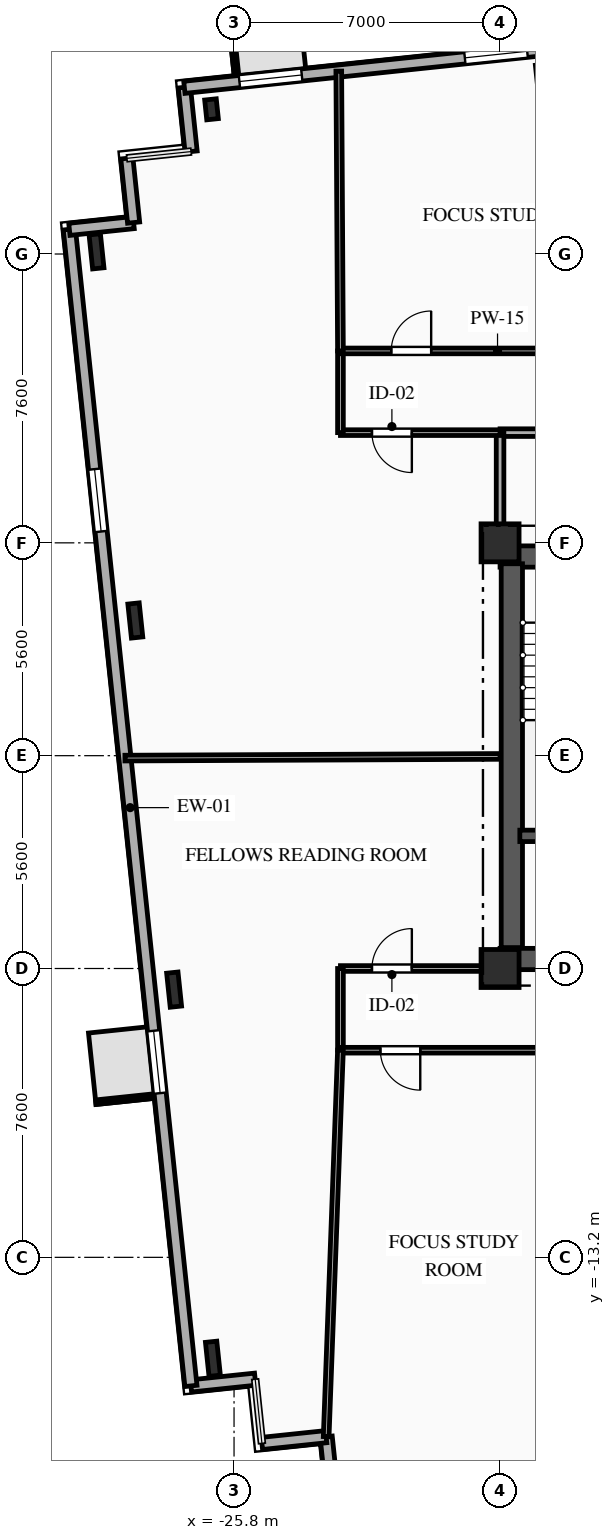
"""IFC4 building model, lengths in metres.
Left out: names, types, materials, properties, quantities, classifications, styles, units other than length and angle.
Written with IfcOpenShell. Run it as: python <this file> out.ifc"""

import sys

from ifc_helpers import new_model, si_unit, direction, frame, frame_2d, origin, origin_2d, place, context, subcontext, project, spatial, rectangle, i_section, extrude, element, fill, save


model = new_model("IFC4")
c1 = context("Model", 3, precision=1e-05, world=origin(), true_north=direction((0.0, 1.0)))
c2 = subcontext(c1, "Body", "Model", "MODEL_VIEW")
j1 = project(units=[si_unit("LENGTHUNIT", "METRE"), si_unit("PLANEANGLEUNIT", "RADIAN")], contexts=[c1])
p1 = place(None, origin())
s1 = spatial("IfcSite", under=j1, at=p1, CompositionType="ELEMENT")
p2 = place(p1, origin())
s2 = spatial("IfcBuilding", under=s1, at=p2, CompositionType="ELEMENT")
p3 = place(p2, frame((0.0, 0.0, 122.55)))
s3 = spatial("IfcBuildingStorey", under=s2, at=p3, CompositionType="ELEMENT", Elevation=122.55)
for number, where, z_axis, x_axis in (
    (1, (-18.8, -5.6, 0.0), (0.0, 0.0, 1.0), (1.0, 0.0, 0.0)),
    (2, (-18.8, 5.6, 0.0), (0.0, 0.0, 1.0), (1.0, 0.0, 0.0)),
):
    element("IfcColumn", number, at=place(p3, frame(where, z_axis=z_axis, x_axis=x_axis)), inside=s3, PredefinedType="COLUMN", context=c2, shape_type="SweptSolid", body=[
        extrude(rectangle(XDim=1.0, YDim=1.0, at=origin_2d()), origin(), (0.0, 0.0, 1.0), 3.35),
    ])
p4 = place(p3, frame((-26.393, 17.007, 0.0), z_axis=(0.0, 0.0, 1.0), x_axis=(0.994521895368, 0.104528463268, 0.0)))
e3 = element("IfcColumn", 3, at=p4, inside=s3, PredefinedType="COLUMN", context=c2, shape_type="SweptSolid", body=[
    extrude(i_section(OverallWidth=0.306, OverallDepth=0.524, WebThickness=0.021, FlangeThickness=0.04, FilletRadius=0.027, at=origin_2d()), origin(), (0.0, 0.0, 1.0), 3.35),
])
for number, where, z_axis, x_axis in (
    (4, (-29.419, 13.271, 0.0), (0.0, 0.0, 1.0), (0.995, 0.105, 0.0)),
    (5, (-28.398, 3.557, 0.0), (0.0, 0.0, 1.0), (0.995, 0.105, 0.0)),
    (6, (-27.377, -6.156, 0.0), (0.0, 0.0, 1.0), (0.995, 0.105, 0.0)),
    (7, (-26.356, -15.869, 0.0), (0.0, 0.0, 1.0), (0.995, 0.105, 0.0)),
):
    element("IfcColumn", number, at=place(p3, frame(where, z_axis=z_axis, x_axis=x_axis)), inside=s3, PredefinedType="COLUMN", context=c2, shape_type="SweptSolid", body=[
        extrude(i_section(OverallWidth=0.3, OverallDepth=0.9, WebThickness=0.019, FlangeThickness=0.035, FilletRadius=0.03, at=origin_2d()), origin(), (0.0, 0.0, 1.0), 3.35),
    ])
for number, where, z_axis, x_axis in (
    (8, (-23.198, -19.609, 0.0), (0.0, 0.0, 1.0), (-0.105, 0.995, 0.0)),
    (9, (-23.376, -17.919, 0.0), (0.0, 0.0, 1.0), (-0.995, -0.105, 0.0)),
):
    element("IfcWall", number, at=place(p3, frame(where, z_axis=z_axis, x_axis=x_axis)), inside=s3, PredefinedType="SOLIDWALL", context=c2, shape_type="SweptSolid", body=[
        extrude(rectangle(XDim=1.7, YDim=0.32, at=frame_2d((0.85, 0.0))), origin(), (0.0, 0.0, 1.0), 3.0),
    ])
p5 = place(p3, frame((-25.244, -16.406, 0.0), z_axis=(0.0, 0.0, 1.0), x_axis=(-0.994521177842, -0.104535289845, 0.0)))
e10 = element("IfcWall", 10, at=p5, inside=s3, PredefinedType="SOLIDWALL", context=c2, shape_type="SweptSolid", body=[
    extrude(rectangle(XDim=1.7, YDim=0.32, at=frame_2d((0.85, 0.0))), origin(), (0.0, 0.0, 1.0), 3.0),
])
p6 = place(p3, frame((-26.935, -16.583, 0.0), z_axis=(0.0, 0.0, 1.0), x_axis=(-0.104524887486, 0.994522271192, 0.0)))
e11 = element("IfcWall", 11, at=p6, inside=s3, PredefinedType="SOLIDWALL", context=c2, shape_type="SweptSolid", body=[
    extrude(rectangle(XDim=30.6, YDim=0.32, at=frame_2d((15.3, 0.0))), origin(), (0.0, 0.0, 1.0), 3.0),
])
p7 = place(p6, frame((7.746, 0.0, 0.85)))
e12 = element("IfcOpeningElement", 12, at=p7, cuts=e11, PredefinedType="OPENING", context=c2, shape_type="SweptSolid", body=[
    extrude(rectangle(XDim=1.65, YDim=1.85, at=frame_2d((0.825, 0.925))), frame((0.0, 0.17, 0.0), z_axis=(0.0, -1.0, 0.0), x_axis=(1.0, 0.0, 0.0)), (0.0, 0.0, 1.0), 0.34),
])
p8 = place(p6, frame((22.606, 0.0, 0.85)))
e13 = element("IfcOpeningElement", 13, at=p8, cuts=e11, PredefinedType="OPENING", context=c2, shape_type="SweptSolid", body=[
    extrude(rectangle(XDim=1.65, YDim=1.85, at=frame_2d((0.825, 0.925))), frame((0.0, 0.17, 0.0), z_axis=(0.0, -1.0, 0.0), x_axis=(1.0, 0.0, 0.0)), (0.0, 0.0, 1.0), 0.34),
])
for number, where, z_axis, x_axis in (
    (14, (-30.133, 13.849, 0.0), (0.0, 0.0, 1.0), (0.995, 0.104, 0.0)),
    (15, (-28.443, 14.027, 0.0), (0.0, 0.0, 1.0), (-0.105, 0.995, 0.0)),
    (16, (-26.93, 15.895, 0.0), (0.0, 0.0, 1.0), (-0.105, 0.995, 0.0)),
):
    element("IfcWall", number, at=place(p3, frame(where, z_axis=z_axis, x_axis=x_axis)), inside=s3, PredefinedType="SOLIDWALL", context=c2, shape_type="SweptSolid", body=[
        extrude(rectangle(XDim=1.7, YDim=0.32, at=frame_2d((0.85, 0.0))), origin(), (0.0, 0.0, 1.0), 3.0),
    ])
p9 = place(p3, frame((-27.107, 17.586, 0.0), z_axis=(0.0, 0.0, 1.0), x_axis=(0.994521628355, 0.104531003701, 0.0)))
e17 = element("IfcWall", 17, at=p9, inside=s3, PredefinedType="SOLIDWALL", context=c2, shape_type="SweptSolid", body=[
    extrude(rectangle(XDim=53.8, YDim=0.32, at=frame_2d((26.9, 0.0))), origin(), (0.0, 0.0, 1.0), 3.0),
])
p10 = place(p9, frame((1.457, 0.0, 0.85)))
e18 = element("IfcOpeningElement", 18, at=p10, cuts=e17, PredefinedType="OPENING", context=c2, shape_type="SweptSolid", body=[
    extrude(rectangle(XDim=1.65, YDim=1.85, at=frame_2d((0.825, 0.925))), frame((0.0, 0.17, 0.0), z_axis=(0.0, -1.0, 0.0), x_axis=(1.0, 0.0, 0.0)), (0.0, 0.0, 1.0), 0.34),
])
p11 = place(p9, frame((7.421, 0.0, 0.85)))
e19 = element("IfcOpeningElement", 19, at=p11, cuts=e17, PredefinedType="OPENING", context=c2, shape_type="SweptSolid", body=[
    extrude(rectangle(XDim=1.65, YDim=1.85, at=frame_2d((0.825, 0.925))), frame((0.0, 0.17, 0.0), z_axis=(0.0, -1.0, 0.0), x_axis=(1.0, 0.0, 0.0)), (0.0, 0.0, 1.0), 0.34),
])
p12 = place(p9, frame((16.743, 0.0, 0.85)))
e20 = element("IfcOpeningElement", 20, at=p12, cuts=e17, PredefinedType="OPENING", context=c2, shape_type="SweptSolid", body=[
    extrude(rectangle(XDim=1.5, YDim=1.85, at=frame_2d((0.75, 0.925))), frame((0.0, 0.17, 0.0), z_axis=(0.0, -1.0, 0.0), x_axis=(1.0, 0.0, 0.0)), (0.0, 0.0, 1.0), 0.34),
])
p13 = place(p9, frame((22.918, 0.0, 0.85)))
e21 = element("IfcOpeningElement", 21, at=p13, cuts=e17, PredefinedType="OPENING", context=c2, shape_type="SweptSolid", body=[
    extrude(rectangle(XDim=2.2, YDim=1.85, at=frame_2d((1.1, 0.925))), frame((0.0, 0.17, 0.0), z_axis=(0.0, -1.0, 0.0), x_axis=(1.0, 0.0, 0.0)), (0.0, 0.0, 1.0), 0.34),
])
p14 = place(p9, frame((30.604, 0.0, 0.85)))
e22 = element("IfcOpeningElement", 22, at=p14, cuts=e17, PredefinedType="OPENING", context=c2, shape_type="SweptSolid", body=[
    extrude(rectangle(XDim=2.2, YDim=1.85, at=frame_2d((1.1, 0.925))), frame((0.0, 0.17, 0.0), z_axis=(0.0, -1.0, 0.0), x_axis=(1.0, 0.0, 0.0)), (0.0, 0.0, 1.0), 0.34),
])
p15 = place(p9, frame((38.289, 0.0, 0.85)))
e23 = element("IfcOpeningElement", 23, at=p15, cuts=e17, PredefinedType="OPENING", context=c2, shape_type="SweptSolid", body=[
    extrude(rectangle(XDim=2.2, YDim=1.85, at=frame_2d((1.1, 0.925))), frame((0.0, 0.17, 0.0), z_axis=(0.0, -1.0, 0.0), x_axis=(1.0, 0.0, 0.0)), (0.0, 0.0, 1.0), 0.34),
])
p16 = place(p9, frame((44.208, 0.0, 0.85)))
e24 = element("IfcOpeningElement", 24, at=p16, cuts=e17, PredefinedType="OPENING", context=c2, shape_type="SweptSolid", body=[
    extrude(rectangle(XDim=1.65, YDim=1.85, at=frame_2d((0.825, 0.925))), frame((0.0, 0.17, 0.0), z_axis=(0.0, -1.0, 0.0), x_axis=(1.0, 0.0, 0.0)), (0.0, 0.0, 1.0), 0.34),
])
p17 = place(p9, frame((47.771, 0.0, 0.85)))
e25 = element("IfcOpeningElement", 25, at=p17, cuts=e17, PredefinedType="OPENING", context=c2, shape_type="SweptSolid", body=[
    extrude(rectangle(XDim=1.65, YDim=1.85, at=frame_2d((0.825, 0.925))), frame((0.0, 0.17, 0.0), z_axis=(0.0, -1.0, 0.0), x_axis=(1.0, 0.0, 0.0)), (0.0, 0.0, 1.0), 0.34),
])
p18 = place(p9, frame((51.129, 0.0, 0.85)))
e26 = element("IfcOpeningElement", 26, at=p18, cuts=e17, PredefinedType="OPENING", context=c2, shape_type="SweptSolid", body=[
    extrude(rectangle(XDim=1.5, YDim=1.85, at=frame_2d((0.75, 0.925))), frame((0.0, 0.17, 0.0), z_axis=(0.0, -1.0, 0.0), x_axis=(1.0, 0.0, 0.0)), (0.0, 0.0, 1.0), 0.34),
])
p19 = place(p3, frame((30.307, -13.986, 0.0), z_axis=(0.0, 0.0, 1.0), x_axis=(-0.994521628355, -0.104531003701, 0.0)))
e27 = element("IfcWall", 27, at=p19, inside=s3, PredefinedType="SOLIDWALL", context=c2, shape_type="SweptSolid", body=[
    extrude(rectangle(XDim=53.8, YDim=0.32, at=frame_2d((26.9, 0.0))), origin(), (0.0, 0.0, 1.0), 3.0),
])
p20 = place(p19, frame((3.098, 0.0, 0.85)))
e28 = element("IfcOpeningElement", 28, at=p20, cuts=e27, PredefinedType="OPENING", context=c2, shape_type="SweptSolid", body=[
    extrude(rectangle(XDim=1.65, YDim=1.85, at=frame_2d((0.825, 0.925))), frame((0.0, 0.17, 0.0), z_axis=(0.0, -1.0, 0.0), x_axis=(1.0, 0.0, 0.0)), (0.0, 0.0, 1.0), 0.34),
])
p21 = place(p19, frame((10.143, 0.0, 0.85)))
e29 = element("IfcOpeningElement", 29, at=p21, cuts=e27, PredefinedType="OPENING", context=c2, shape_type="SweptSolid", body=[
    extrude(rectangle(XDim=1.65, YDim=1.85, at=frame_2d((0.825, 0.925))), frame((0.0, 0.17, 0.0), z_axis=(0.0, -1.0, 0.0), x_axis=(1.0, 0.0, 0.0)), (0.0, 0.0, 1.0), 0.34),
])
p22 = place(p19, frame((16.753, 0.0, 0.85)))
e30 = element("IfcOpeningElement", 30, at=p22, cuts=e27, PredefinedType="OPENING", context=c2, shape_type="SweptSolid", body=[
    extrude(rectangle(XDim=2.2, YDim=1.85, at=frame_2d((1.1, 0.925))), frame((0.0, 0.17, 0.0), z_axis=(0.0, -1.0, 0.0), x_axis=(1.0, 0.0, 0.0)), (0.0, 0.0, 1.0), 0.34),
])
p23 = place(p19, frame((23.358, 0.0, 0.85)))
e31 = element("IfcOpeningElement", 31, at=p23, cuts=e27, PredefinedType="OPENING", context=c2, shape_type="SweptSolid", body=[
    extrude(rectangle(XDim=2.2, YDim=1.85, at=frame_2d((1.1, 0.925))), frame((0.0, 0.17, 0.0), z_axis=(0.0, -1.0, 0.0), x_axis=(1.0, 0.0, 0.0)), (0.0, 0.0, 1.0), 0.34),
])
p24 = place(p19, frame((29.963, 0.0, 0.85)))
e32 = element("IfcOpeningElement", 32, at=p24, cuts=e27, PredefinedType="OPENING", context=c2, shape_type="SweptSolid", body=[
    extrude(rectangle(XDim=2.2, YDim=1.85, at=frame_2d((1.1, 0.925))), frame((0.0, 0.17, 0.0), z_axis=(0.0, -1.0, 0.0), x_axis=(1.0, 0.0, 0.0)), (0.0, 0.0, 1.0), 0.34),
])
p25 = place(p19, frame((36.568, 0.0, 0.85)))
e33 = element("IfcOpeningElement", 33, at=p25, cuts=e27, PredefinedType="OPENING", context=c2, shape_type="SweptSolid", body=[
    extrude(rectangle(XDim=2.2, YDim=1.85, at=frame_2d((1.1, 0.925))), frame((0.0, 0.17, 0.0), z_axis=(0.0, -1.0, 0.0), x_axis=(1.0, 0.0, 0.0)), (0.0, 0.0, 1.0), 0.34),
])
p26 = place(p19, frame((43.173, 0.0, 0.85)))
e34 = element("IfcOpeningElement", 34, at=p26, cuts=e27, PredefinedType="OPENING", context=c2, shape_type="SweptSolid", body=[
    extrude(rectangle(XDim=2.2, YDim=1.85, at=frame_2d((1.1, 0.925))), frame((0.0, 0.17, 0.0), z_axis=(0.0, -1.0, 0.0), x_axis=(1.0, 0.0, 0.0)), (0.0, 0.0, 1.0), 0.34),
])
p27 = place(p19, frame((49.653, 0.0, 0.85)))
e35 = element("IfcOpeningElement", 35, at=p27, cuts=e27, PredefinedType="OPENING", context=c2, shape_type="SweptSolid", body=[
    extrude(rectangle(XDim=1.65, YDim=1.85, at=frame_2d((0.825, 0.925))), frame((0.0, 0.17, 0.0), z_axis=(0.0, -1.0, 0.0), x_axis=(1.0, 0.0, 0.0)), (0.0, 0.0, 1.0), 0.34),
])
p28 = place(p3, frame((-18.8, 5.24, 0.0), z_axis=(0.0, 0.0, 1.0), x_axis=(1.0, 0.0, 0.0)))
e36 = element("IfcWall", 36, at=p28, inside=s3, PredefinedType="SHEAR", context=c2, shape_type="SweptSolid", body=[
    extrude(rectangle(XDim=9.6, YDim=0.56, at=frame_2d((4.8, 0.0))), origin(), (0.0, 0.0, 1.0), 3.0),
])
p29 = place(p28, frame((1.55, 0.0, 0.0)))
e37 = element("IfcOpeningElement", 37, at=p29, cuts=e36, PredefinedType="OPENING", context=c2, shape_type="SweptSolid", body=[
    extrude(rectangle(XDim=1.1, YDim=2.15, at=frame_2d((0.55, 1.075))), frame((0.0, 0.29, 0.0), z_axis=(0.0, -1.0, 0.0), x_axis=(1.0, 0.0, 0.0)), (0.0, 0.0, 1.0), 0.58),
])
p30 = place(p28, frame((4.775, 0.0, 0.0)))
e38 = element("IfcOpeningElement", 38, at=p30, cuts=e36, PredefinedType="OPENING", context=c2, shape_type="SweptSolid", body=[
    extrude(rectangle(XDim=1.05, YDim=2.1, at=frame_2d((0.525, 1.05))), frame((0.0, 0.29, 0.0), z_axis=(0.0, -1.0, 0.0), x_axis=(1.0, 0.0, 0.0)), (0.0, 0.0, 1.0), 0.58),
])
p31 = place(p3, frame((-18.8, -5.35, 0.0), z_axis=(0.0, 0.0, 1.0), x_axis=(1.0, 0.0, 0.0)))
e39 = element("IfcWall", 39, at=p31, inside=s3, PredefinedType="SHEAR", context=c2, shape_type="SweptSolid", body=[
    extrude(rectangle(XDim=9.6, YDim=0.56, at=frame_2d((4.8, 0.0))), origin(), (0.0, 0.0, 1.0), 3.0),
])
p32 = place(p31, frame((1.05, 0.0, 0.0)))
e40 = element("IfcOpeningElement", 40, at=p32, cuts=e39, PredefinedType="OPENING", context=c2, shape_type="SweptSolid", body=[
    extrude(rectangle(XDim=0.9, YDim=2.1, at=frame_2d((0.45, 1.05))), frame((0.0, 0.29, 0.0), z_axis=(0.0, -1.0, 0.0), x_axis=(1.0, 0.0, 0.0)), (0.0, 0.0, 1.0), 0.58),
])
p33 = place(p3, frame((-18.49, -5.05, 0.0), z_axis=(0.0, 0.0, 1.0), x_axis=(0.0, 1.0, 0.0)))
e41 = element("IfcWall", 41, at=p33, inside=s3, PredefinedType="SHEAR", context=c2, shape_type="SweptSolid", body=[
    extrude(rectangle(XDim=10.1, YDim=0.56, at=frame_2d((5.05, 0.0))), origin(), (0.0, 0.0, 1.0), 3.0),
])
p34 = place(p3, frame((-18.28, -2.11, 0.0), z_axis=(0.0, 0.0, 1.0), x_axis=(1.0, 0.0, 0.0)))
e42 = element("IfcWall", 42, at=p34, inside=s3, PredefinedType="SHEAR", context=c2, shape_type="SweptSolid", body=[
    extrude(rectangle(XDim=3.18, YDim=0.3, at=frame_2d((1.59, 0.0))), origin(), (0.0, 0.0, 1.0), 3.0),
])
p35 = place(p3, frame((-12.0, 8.5, 0.0), z_axis=(0.0, 0.0, 1.0), x_axis=(-1.0, 0.0, 0.0)))
e43 = element("IfcWall", 43, at=p35, inside=s3, PredefinedType="PARTITIONING", context=c2, shape_type="SweptSolid", body=[
    extrude(rectangle(XDim=6.8, YDim=0.2, at=frame_2d((3.4, 0.0))), origin(), (0.0, 0.0, 1.0), 3.0),
])
p36 = place(p35, frame((1.715, 0.0, 0.0)))
e44 = element("IfcOpeningElement", 44, at=p36, cuts=e43, PredefinedType="OPENING", context=c2, shape_type="SweptSolid", body=[
    extrude(rectangle(XDim=1.1, YDim=2.15, at=frame_2d((0.55, 1.075))), frame((0.0, 0.11, 0.0), z_axis=(0.0, -1.0, 0.0), x_axis=(1.0, 0.0, 0.0)), (0.0, 0.0, 1.0), 0.22),
])
p37 = place(p3, frame((-18.8, 8.5, 0.0), z_axis=(0.0, 0.0, 1.0), x_axis=(0.0, -1.0, 0.0)))
e45 = element("IfcWall", 45, at=p37, inside=s3, PredefinedType="PARTITIONING", context=c2, shape_type="SweptSolid", body=[
    extrude(rectangle(XDim=2.9, YDim=0.2, at=frame_2d((1.45, 0.0))), origin(), (0.0, 0.0, 1.0), 2.485),
])
p38 = place(p3, frame((-18.8, 8.5, 0.0), z_axis=(0.0, 0.0, 1.0), x_axis=(-1.0, 0.0, 0.0)))
e46 = element("IfcWall", 46, at=p38, inside=s3, PredefinedType="PARTITIONING", context=c2, shape_type="SweptSolid", body=[
    extrude(rectangle(XDim=4.2, YDim=0.15, at=frame_2d((2.1, 0.0))), origin(), (0.0, 0.0, 1.0), 3.0),
])
p39 = place(p38, frame((2.321, 0.0, 0.0)))
e47 = element("IfcOpeningElement", 47, at=p39, cuts=e46, PredefinedType="OPENING", context=c2, shape_type="SweptSolid", body=[
    extrude(rectangle(XDim=1.05, YDim=2.15, at=frame_2d((0.525, 1.075))), frame((0.0, 0.085, 0.0), z_axis=(0.0, -1.0, 0.0), x_axis=(1.0, 0.0, 0.0)), (0.0, 0.0, 1.0), 0.17),
])
p40 = place(p3, frame((-23.0, 8.5, 0.0), z_axis=(0.0, 0.0, 1.0), x_axis=(0.0, 1.0, 0.0)))
e48 = element("IfcWall", 48, at=p40, inside=s3, PredefinedType="PARTITIONING", context=c2, shape_type="SweptSolid", body=[
    extrude(rectangle(XDim=2.15, YDim=0.15, at=frame_2d((1.075, 0.0))), origin(), (0.0, 0.0, 1.0), 3.0),
])
p41 = place(p3, frame((-23.0, 10.65, 0.0), z_axis=(0.0, 0.0, 1.0), x_axis=(1.0, 0.0, 0.0)))
e49 = element("IfcWall", 49, at=p41, inside=s3, PredefinedType="PARTITIONING", context=c2, shape_type="SweptSolid", body=[
    extrude(rectangle(XDim=8.267, YDim=0.15, at=frame_2d((4.134, 0.0))), origin(), (0.0, 0.0, 1.0), 3.0),
])
p42 = place(p41, frame((1.337, 0.0, 0.0)))
e50 = element("IfcOpeningElement", 50, at=p42, cuts=e49, PredefinedType="OPENING", context=c2, shape_type="SweptSolid", body=[
    extrude(rectangle(XDim=1.05, YDim=2.15, at=frame_2d((0.525, 1.075))), frame((0.0, 0.085, 0.0), z_axis=(0.0, -1.0, 0.0), x_axis=(1.0, 0.0, 0.0)), (0.0, 0.0, 1.0), 0.17),
])
p43 = place(p3, frame((-23.0, -5.6, 0.0), z_axis=(0.0, 0.0, 1.0), x_axis=(1.0, 0.0, 0.0)))
e51 = element("IfcWall", 51, at=p43, inside=s3, PredefinedType="PARTITIONING", context=c2, shape_type="SweptSolid", body=[
    extrude(rectangle(XDim=4.2, YDim=0.15, at=frame_2d((2.1, 0.0))), origin(), (0.0, 0.0, 1.0), 3.0),
])
p44 = place(p43, frame((0.829, 0.0, 0.0)))
e52 = element("IfcOpeningElement", 52, at=p44, cuts=e51, PredefinedType="OPENING", context=c2, shape_type="SweptSolid", body=[
    extrude(rectangle(XDim=1.05, YDim=2.15, at=frame_2d((0.525, 1.075))), frame((0.0, 0.085, 0.0), z_axis=(0.0, -1.0, 0.0), x_axis=(1.0, 0.0, 0.0)), (0.0, 0.0, 1.0), 0.17),
])
p45 = place(p3, frame((-23.0, -7.75, 0.0), z_axis=(0.0, 0.0, 1.0), x_axis=(0.0, 1.0, 0.0)))
e53 = element("IfcWall", 53, at=p45, inside=s3, PredefinedType="PARTITIONING", context=c2, shape_type="SweptSolid", body=[
    extrude(rectangle(XDim=2.15, YDim=0.15, at=frame_2d((1.075, 0.0))), origin(), (0.0, 0.0, 1.0), 2.655),
])
p46 = place(p3, frame((-17.029, -7.75, 0.0), z_axis=(0.0, 0.0, 1.0), x_axis=(-1.0, 0.0, 0.0)))
e54 = element("IfcWall", 54, at=p46, inside=s3, PredefinedType="PARTITIONING", context=c2, shape_type="SweptSolid", body=[
    extrude(rectangle(XDim=5.971, YDim=0.15, at=frame_2d((2.985, 0.0))), origin(), (0.0, 0.0, 1.0), 3.0),
])
p47 = place(p46, frame((3.871, 0.0, 0.0)))
e55 = element("IfcOpeningElement", 55, at=p47, cuts=e54, PredefinedType="OPENING", context=c2, shape_type="SweptSolid", body=[
    extrude(rectangle(XDim=1.05, YDim=2.15, at=frame_2d((0.525, 1.075))), frame((0.0, 0.085, 0.0), z_axis=(0.0, -1.0, 0.0), x_axis=(1.0, 0.0, 0.0)), (0.0, 0.0, 1.0), 0.17),
])
p48 = place(p3, frame((-28.671, -0.064, 0.0), z_axis=(0.0, 0.0, 1.0), x_axis=(0.999990089865, 0.004451985263, 0.0)))
e56 = element("IfcWall", 56, at=p48, inside=s3, PredefinedType="PARTITIONING", context=c2, shape_type="SweptSolid", body=[
    extrude(rectangle(XDim=9.871, YDim=0.15, at=frame_2d((4.936, 0.0))), origin(), (0.0, 0.0, 1.0), 3.0),
])
p49 = place(p3, frame((-23.0, -7.75, 0.0), z_axis=(0.0, 0.0, 1.0), x_axis=(-0.036924695214, -0.999318050914, 0.0)))
e57 = element("IfcWall", 57, at=p49, inside=s3, PredefinedType="PARTITIONING", context=c2, shape_type="SweptSolid", body=[
    extrude(rectangle(XDim=10.176, YDim=0.15, at=frame_2d((5.088, 0.0))), origin(), (0.0, 0.0, 1.0), 3.0),
])
p50 = place(p3, frame((-23.044, 18.013, 0.0), z_axis=(0.0, 0.0, 1.0), x_axis=(0.005968459246, -0.999982188588, 0.0)))
e58 = element("IfcWall", 58, at=p50, inside=s3, PredefinedType="PARTITIONING", context=c2, shape_type="SweptSolid", body=[
    extrude(rectangle(XDim=7.363, YDim=0.15, at=frame_2d((3.682, 0.0))), origin(), (0.0, 0.0, 1.0), 3.0),
])
p51 = place(p7, origin())
e59 = element("IfcWindow", 59, at=p51, inside=s3, PartitioningType="SINGLE_PANEL", PredefinedType="WINDOW", context=c2, shape_type="SweptSolid", body=[
    extrude(rectangle(XDim=1.65, YDim=1.85, at=frame_2d((0.825, 0.925))), frame((0.0, 0.03, 0.0), z_axis=(0.0, -1.0, 0.0), x_axis=(1.0, 0.0, 0.0)), (0.0, 0.0, 1.0), 0.06),
])
fill(e12, e59)
p52 = place(p8, origin())
e60 = element("IfcWindow", 60, at=p52, inside=s3, PartitioningType="SINGLE_PANEL", PredefinedType="WINDOW", context=c2, shape_type="SweptSolid", body=[
    extrude(rectangle(XDim=1.65, YDim=1.85, at=frame_2d((0.825, 0.925))), frame((0.0, 0.03, 0.0), z_axis=(0.0, -1.0, 0.0), x_axis=(1.0, 0.0, 0.0)), (0.0, 0.0, 1.0), 0.06),
])
fill(e13, e60)
p53 = place(p10, origin())
e61 = element("IfcWindow", 61, at=p53, inside=s3, PartitioningType="SINGLE_PANEL", PredefinedType="WINDOW", context=c2, shape_type="SweptSolid", body=[
    extrude(rectangle(XDim=1.65, YDim=1.85, at=frame_2d((0.825, 0.925))), frame((0.0, 0.03, 0.0), z_axis=(0.0, -1.0, 0.0), x_axis=(1.0, 0.0, 0.0)), (0.0, 0.0, 1.0), 0.06),
])
fill(e18, e61)
p54 = place(p11, origin())
e62 = element("IfcWindow", 62, at=p54, inside=s3, PartitioningType="SINGLE_PANEL", PredefinedType="WINDOW", context=c2, shape_type="SweptSolid", body=[
    extrude(rectangle(XDim=1.65, YDim=1.85, at=frame_2d((0.825, 0.925))), frame((0.0, 0.03, 0.0), z_axis=(0.0, -1.0, 0.0), x_axis=(1.0, 0.0, 0.0)), (0.0, 0.0, 1.0), 0.06),
])
fill(e19, e62)
p55 = place(p39, origin())
e63 = element("IfcDoor", 63, at=p55, inside=s3, OperationType="SINGLE_SWING_LEFT", PredefinedType="DOOR", context=c2, shape_type="SweptSolid", body=[
    extrude(rectangle(XDim=1.05, YDim=2.15, at=frame_2d((0.525, 1.075))), frame((0.0, 0.025, 0.0), z_axis=(0.0, -1.0, 0.0), x_axis=(1.0, 0.0, 0.0)), (0.0, 0.0, 1.0), 0.05),
])
fill(e47, e63)
p56 = place(p42, origin())
e64 = element("IfcDoor", 64, at=p56, inside=s3, OperationType="SINGLE_SWING_RIGHT", PredefinedType="DOOR", context=c2, shape_type="SweptSolid", body=[
    extrude(rectangle(XDim=1.05, YDim=2.15, at=frame_2d((0.525, 1.075))), frame((0.0, 0.025, 0.0), z_axis=(0.0, -1.0, 0.0), x_axis=(1.0, 0.0, 0.0)), (0.0, 0.0, 1.0), 0.05),
])
fill(e50, e64)
p57 = place(p44, origin())
e65 = element("IfcDoor", 65, at=p57, inside=s3, OperationType="SINGLE_SWING_RIGHT", PredefinedType="DOOR", context=c2, shape_type="SweptSolid", body=[
    extrude(rectangle(XDim=1.05, YDim=2.15, at=frame_2d((0.525, 1.075))), frame((0.0, 0.025, 0.0), z_axis=(0.0, -1.0, 0.0), x_axis=(1.0, 0.0, 0.0)), (0.0, 0.0, 1.0), 0.05),
])
fill(e52, e65)
p58 = place(p47, origin())
e66 = element("IfcDoor", 66, at=p58, inside=s3, OperationType="SINGLE_SWING_LEFT", PredefinedType="DOOR", context=c2, shape_type="SweptSolid", body=[
    extrude(rectangle(XDim=1.05, YDim=2.15, at=frame_2d((0.525, 1.075))), frame((0.0, 0.025, 0.0), z_axis=(0.0, -1.0, 0.0), x_axis=(1.0, 0.0, 0.0)), (0.0, 0.0, 1.0), 0.05),
])
fill(e55, e66)
save(model, sys.argv[1])
